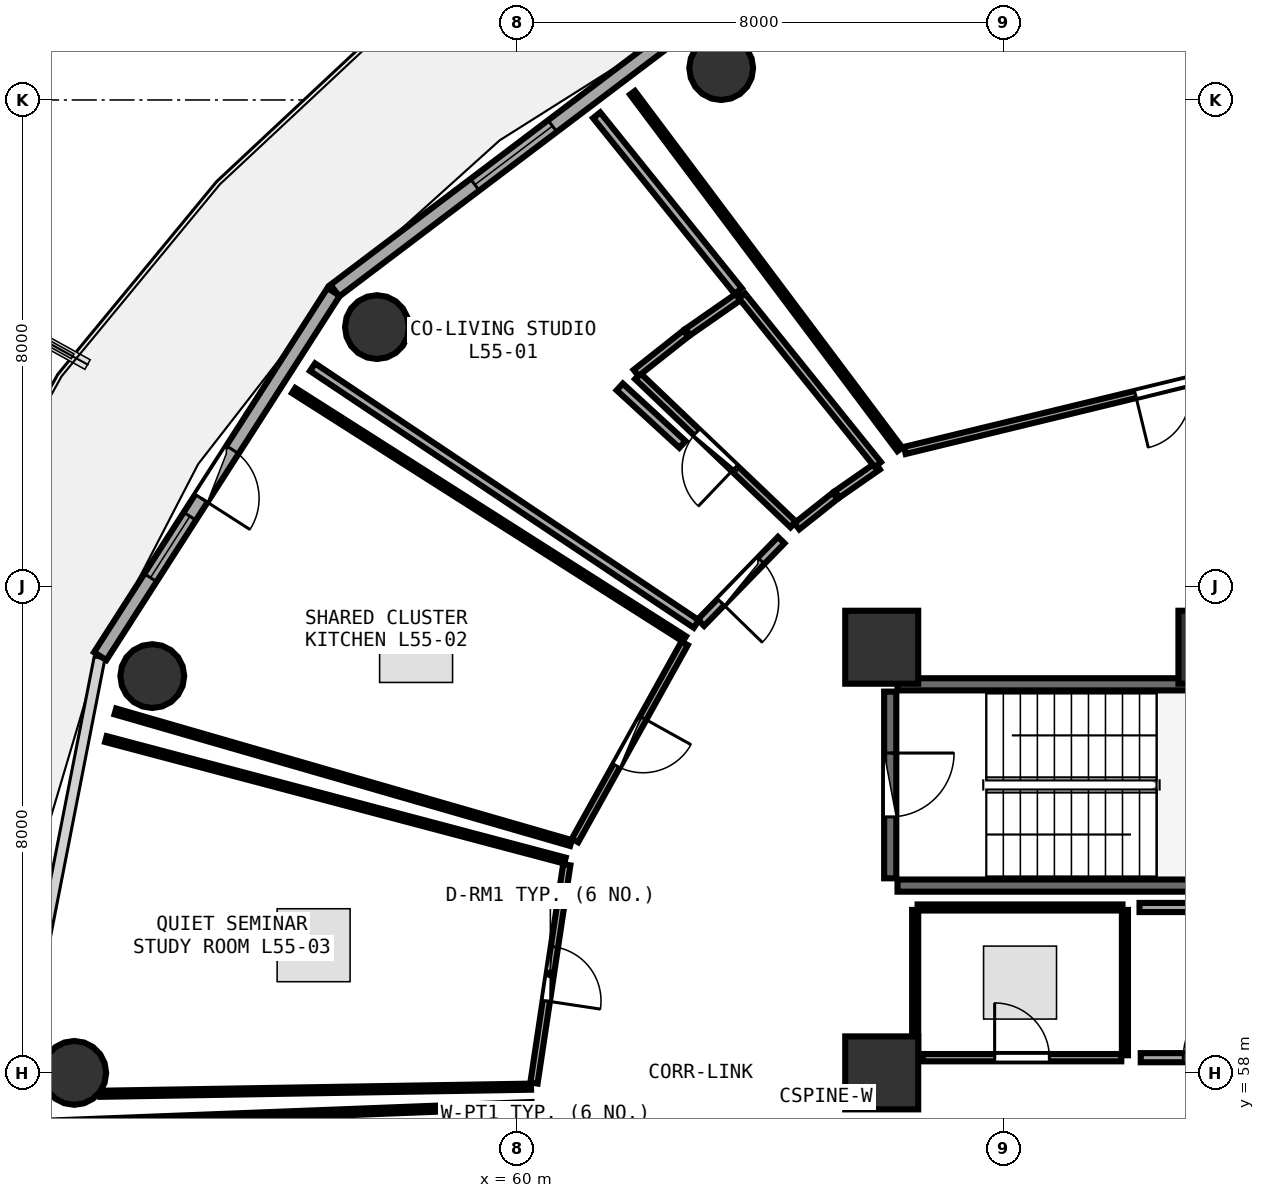
"""IFC4 building model, lengths in metres.
Left out: names, types, materials, properties, quantities, classifications, styles, units other than length and angle.
Written with IfcOpenShell. Run it as: python <this file> out.ifc"""

import sys

from ifc_helpers import new_model, si_unit, direction, frame, frame_2d, origin, origin_2d, place, context, subcontext, project, spatial, rectangle, circle, extrude, element, fill, save


model = new_model("IFC4")
c1 = context("Model", 3, precision=1e-05, world=origin(), true_north=direction((0.0, 1.0)))
c2 = subcontext(c1, "Body", "Model", "MODEL_VIEW")
j1 = project(units=[si_unit("LENGTHUNIT", "METRE"), si_unit("PLANEANGLEUNIT", "RADIAN")], contexts=[c1])
p1 = place(None, origin())
s1 = spatial("IfcSite", under=j1, at=p1, CompositionType="ELEMENT")
p2 = place(p1, origin())
s2 = spatial("IfcBuilding", under=s1, at=p2, CompositionType="ELEMENT")
p3 = place(p2, frame((0.0, 0.0, 215.7)))
s3 = spatial("IfcBuildingStorey", under=s2, at=p3, CompositionType="ELEMENT", Elevation=215.7)
for number, where, z_axis, x_axis in (
    (1, (71.48, 65.0, 0.0), (0.0, 0.0, 1.0), (1.0, 0.0, 0.0)),
    (2, (66.0, 65.0, 0.0), (0.0, 0.0, 1.0), (1.0, 0.0, 0.0)),
    (3, (66.0, 58.0, 0.0), (0.0, 0.0, 1.0), (1.0, 0.0, 0.0)),
):
    element("IfcColumn", number, at=place(p3, frame(where, z_axis=z_axis, x_axis=x_axis)), inside=s3, PredefinedType="PILASTER", context=c2, shape_type="SweptSolid", body=[
        extrude(rectangle(XDim=1.2, YDim=1.2, at=origin_2d()), origin(), (0.0, 0.0, 1.0), 3.75),
    ])
for number, where, z_axis, x_axis in (
    (4, (63.36, 74.524, 0.0), (0.0, 0.0, 1.0), (1.0, 0.0, 0.0)),
    (5, (57.698, 70.264, 0.0), (0.0, 0.0, 1.0), (1.0, 0.0, 0.0)),
    (6, (54.003, 64.526, 0.0), (0.0, 0.0, 1.0), (1.0, 0.0, 0.0)),
    (7, (52.72, 58.0, 0.0), (0.0, 0.0, 1.0), (1.0, 0.0, 0.0)),
):
    element("IfcColumn", number, at=place(p3, frame(where, z_axis=z_axis, x_axis=x_axis)), inside=s3, PredefinedType="COLUMN", context=c2, shape_type="SweptSolid", body=[
        extrude(circle(Radius=0.525, at=origin_2d()), origin(), (0.0, 0.0, 1.0), 3.75),
    ])
p4 = place(p3, frame((62.888, 75.312, 0.0), z_axis=(0.0, 0.0, 1.0), x_axis=(-0.797701674595, -0.603052268338, 0.0)))
e8 = element("IfcWall", 8, at=p4, inside=s3, PredefinedType="SOLIDWALL", context=c2, shape_type="SweptSolid", body=[
    extrude(rectangle(XDim=7.374, YDim=0.24, at=frame_2d((3.687, 0.0))), origin(), (0.0, 0.0, 1.0), 3.475),
])
p5 = place(p4, frame((2.887, 0.0, 0.85)))
e9 = element("IfcOpeningElement", 9, at=p5, cuts=e8, PredefinedType="OPENING", context=c2, shape_type="SweptSolid", body=[
    extrude(rectangle(XDim=1.6, YDim=1.45, at=frame_2d((0.8, 0.725))), frame((0.0, 0.13, 0.0), z_axis=(0.0, -1.0, 0.0), x_axis=(1.0, 0.0, 0.0)), (0.0, 0.0, 1.0), 0.26),
])
p6 = place(p3, frame((56.986, 70.843, 0.0), z_axis=(0.0, 0.0, 1.0), x_axis=(-0.539539512973, -0.841960280501, 0.0)))
e10 = element("IfcWall", 10, at=p6, inside=s3, PredefinedType="SOLIDWALL", context=c2, shape_type="SweptSolid", body=[
    extrude(rectangle(XDim=7.115, YDim=0.24, at=frame_2d((3.557, 0.0))), origin(), (0.0, 0.0, 1.0), 3.475),
])
p7 = place(p6, frame((3.082, 0.0, 0.0)))
e11 = element("IfcOpeningElement", 11, at=p7, cuts=e10, PredefinedType="OPENING", context=c2, shape_type="SweptSolid", body=[
    extrude(rectangle(XDim=0.95, YDim=2.1, at=frame_2d((0.475, 1.05))), frame((0.0, 0.13, 0.0), z_axis=(0.0, -1.0, 0.0), x_axis=(1.0, 0.0, 0.0)), (0.0, 0.0, 1.0), 0.26),
])
p8 = place(p6, frame((4.382, 0.0, 0.85)))
e12 = element("IfcOpeningElement", 12, at=p8, cuts=e10, PredefinedType="OPENING", context=c2, shape_type="SweptSolid", body=[
    extrude(rectangle(XDim=1.2, YDim=1.45, at=frame_2d((0.6, 0.725))), frame((0.0, 0.13, 0.0), z_axis=(0.0, -1.0, 0.0), x_axis=(1.0, 0.0, 0.0)), (0.0, 0.0, 1.0), 0.26),
])
p9 = place(p3, frame((51.803, 57.985, 0.0), z_axis=(0.0, 0.0, 1.0), x_axis=(0.192069055673, -0.981381413036, 0.0)))
e13 = element("IfcWall", 13, at=p9, inside=s3, PredefinedType="SOLIDWALL", context=c2, shape_type="SweptSolid", body=[
    extrude(rectangle(XDim=6.94, YDim=0.24, at=frame_2d((3.47, 0.0))), origin(), (0.0, 0.0, 1.0), 3.475),
])
p10 = place(p9, frame((2.67, 0.0, 0.85)))
e14 = element("IfcOpeningElement", 14, at=p10, cuts=e13, PredefinedType="OPENING", context=c2, shape_type="SweptSolid", body=[
    extrude(rectangle(XDim=1.6, YDim=1.45, at=frame_2d((0.8, 0.725))), frame((0.0, 0.13, 0.0), z_axis=(0.0, -1.0, 0.0), x_axis=(1.0, 0.0, 0.0)), (0.0, 0.0, 1.0), 0.26),
])
for number, where, z_axis, x_axis in (
    (15, (66.26, 61.08, 0.0), (0.0, 0.0, 1.0), (1.0, 0.0, 0.0)),
    (16, (73.42, 64.39, 0.0), (0.0, 0.0, 1.0), (-1.0, 0.0, 0.0)),
):
    element("IfcWall", number, at=place(p3, frame(where, z_axis=z_axis, x_axis=x_axis)), inside=s3, PredefinedType="SHEAR", context=c2, shape_type="SweptSolid", body=[
        extrude(rectangle(XDim=7.16, YDim=0.2, at=frame_2d((3.58, 0.0))), origin(), (0.0, 0.0, 1.0), 3.49),
    ])
p11 = place(p3, frame((66.14, 64.27, 0.0), z_axis=(0.0, 0.0, 1.0), x_axis=(0.0, -1.0, 0.0)))
e17 = element("IfcWall", 17, at=p11, inside=s3, PredefinedType="SHEAR", context=c2, shape_type="SweptSolid", body=[
    extrude(rectangle(XDim=3.07, YDim=0.2, at=frame_2d((1.535, 0.0))), origin(), (0.0, 0.0, 1.0), 3.49),
])
p12 = place(p11, frame((1.01, 0.0, 0.0)))
e18 = element("IfcOpeningElement", 18, at=p12, cuts=e17, PredefinedType="OPENING", context=c2, shape_type="SweptSolid", body=[
    extrude(rectangle(XDim=1.05, YDim=2.1, at=frame_2d((0.525, 1.05))), frame((0.0, 0.11, 0.0), z_axis=(0.0, -1.0, 0.0), x_axis=(1.0, 0.0, 0.0)), (0.0, 0.0, 1.0), 0.22),
])
p13 = place(p3, frame((66.675, 58.25, 0.0), z_axis=(0.0, 0.0, 1.0), x_axis=(1.0, 0.0, 0.0)))
e19 = element("IfcWall", 19, at=p13, inside=s3, PredefinedType="PARTITIONING", context=c2, shape_type="SweptSolid", body=[
    extrude(rectangle(XDim=3.265, YDim=0.12, at=frame_2d((1.632, 0.0))), origin(), (0.0, 0.0, 1.0), 3.48),
])
p14 = place(p13, frame((1.182, 0.0, 0.0)))
e20 = element("IfcOpeningElement", 20, at=p14, cuts=e19, PredefinedType="OPENING", context=c2, shape_type="SweptSolid", body=[
    extrude(rectangle(XDim=0.9, YDim=2.08, at=frame_2d((0.45, 1.04))), frame((0.0, 0.07, 0.0), z_axis=(0.0, -1.0, 0.0), x_axis=(1.0, 0.0, 0.0)), (0.0, 0.0, 1.0), 0.14),
])
p15 = place(p3, frame((70.26, 58.25, 0.0), z_axis=(0.0, 0.0, 1.0), x_axis=(1.0, 0.0, 0.0)))
e21 = element("IfcWall", 21, at=p15, inside=s3, PredefinedType="PARTITIONING", context=c2, shape_type="SweptSolid", body=[
    extrude(rectangle(XDim=2.48, YDim=0.15, at=frame_2d((1.24, 0.0))), origin(), (0.0, 0.0, 1.0), 3.48),
])
p16 = place(p15, frame((0.7, 0.0, 0.0)))
e22 = element("IfcOpeningElement", 22, at=p16, cuts=e21, PredefinedType="OPENING", context=c2, shape_type="SweptSolid", body=[
    extrude(rectangle(XDim=1.08, YDim=2.1, at=frame_2d((0.54, 1.05))), frame((0.0, 0.085, 0.0), z_axis=(0.0, -1.0, 0.0), x_axis=(1.0, 0.0, 0.0)), (0.0, 0.0, 1.0), 0.17),
])
p17 = place(p3, frame((74.84, 70.29, 0.0), z_axis=(0.0, 0.0, 1.0), x_axis=(-0.971771434763, -0.235924306884, 0.0)))
e23 = element("IfcWall", 23, at=p17, inside=s3, PredefinedType="PARTITIONING", context=c2, shape_type="SweptSolid", body=[
    extrude(rectangle(XDim=8.705, YDim=0.12, at=frame_2d((4.353, 0.0))), origin(), (0.0, 0.0, 1.0), 3.025),
])
p18 = place(p17, frame((3.903, 0.0, 0.0)))
e24 = element("IfcOpeningElement", 24, at=p18, cuts=e23, PredefinedType="OPENING", context=c2, shape_type="SweptSolid", body=[
    extrude(rectangle(XDim=0.9, YDim=2.08, at=frame_2d((0.45, 1.04))), frame((0.0, 0.07, 0.0), z_axis=(0.0, -1.0, 0.0), x_axis=(1.0, 0.0, 0.0)), (0.0, 0.0, 1.0), 0.14),
])
p19 = place(p3, frame((64.545, 67.018, 0.0), z_axis=(0.0, 0.0, 1.0), x_axis=(-0.723495138875, 0.690329474979, 0.0)))
e25 = element("IfcWall", 25, at=p19, inside=s3, PredefinedType="PLUMBINGWALL", context=c2, shape_type="SweptSolid", body=[
    extrude(rectangle(XDim=3.533, YDim=0.13, at=frame_2d((1.767, 0.0))), origin(), (0.0, 0.0, 1.0), 3.175),
])
p20 = place(p19, frame((1.337, 0.0, 0.0)))
e26 = element("IfcOpeningElement", 26, at=p20, cuts=e25, PredefinedType="OPENING", context=c2, shape_type="SweptSolid", body=[
    extrude(rectangle(XDim=0.86, YDim=2.05, at=frame_2d((0.43, 1.025))), frame((0.0, 0.075, 0.0), z_axis=(0.0, -1.0, 0.0), x_axis=(1.0, 0.0, 0.0)), (0.0, 0.0, 1.0), 0.15),
])
p21 = place(p3, frame((64.347, 66.762, 0.0), z_axis=(0.0, 0.0, 1.0), x_axis=(-0.697118859216, -0.716955574722, 0.0)))
e27 = element("IfcWall", 27, at=p21, inside=s3, PredefinedType="PARTITIONING", context=c2, shape_type="SweptSolid", body=[
    extrude(rectangle(XDim=1.895, YDim=0.15, at=frame_2d((0.948, 0.0))), origin(), (0.0, 0.0, 1.0), 3.025),
])
p22 = place(p21, frame((0.473, 0.0, 0.0)))
e28 = element("IfcOpeningElement", 28, at=p22, cuts=e27, PredefinedType="OPENING", context=c2, shape_type="SweptSolid", body=[
    extrude(rectangle(XDim=0.95, YDim=2.08, at=frame_2d((0.475, 1.04))), frame((0.0, 0.085, 0.0), z_axis=(0.0, -1.0, 0.0), x_axis=(1.0, 0.0, 0.0)), (0.0, 0.0, 1.0), 0.17),
])
p23 = place(p3, frame((62.759, 65.064, 0.0), z_axis=(0.0, 0.0, 1.0), x_axis=(-0.485877595764, -0.874026865683, 0.0)))
e29 = element("IfcWall", 29, at=p23, inside=s3, PredefinedType="PARTITIONING", context=c2, shape_type="SweptSolid", body=[
    extrude(rectangle(XDim=3.71, YDim=0.12, at=frame_2d((1.855, 0.0))), origin(), (0.0, 0.0, 1.0), 3.025),
])
p24 = place(p23, frame((1.405, 0.0, 0.0)))
e30 = element("IfcOpeningElement", 30, at=p24, cuts=e29, PredefinedType="OPENING", context=c2, shape_type="SweptSolid", body=[
    extrude(rectangle(XDim=0.9, YDim=2.08, at=frame_2d((0.45, 1.04))), frame((0.0, 0.07, 0.0), z_axis=(0.0, -1.0, 0.0), x_axis=(1.0, 0.0, 0.0)), (0.0, 0.0, 1.0), 0.14),
])
p25 = place(p3, frame((60.82, 61.422, 0.0), z_axis=(0.0, 0.0, 1.0), x_axis=(-0.148557592641, -0.988903757536, 0.0)))
e31 = element("IfcWall", 31, at=p25, inside=s3, PredefinedType="PARTITIONING", context=c2, shape_type="SweptSolid", body=[
    extrude(rectangle(XDim=3.629, YDim=0.12, at=frame_2d((1.814, 0.0))), origin(), (0.0, 0.0, 1.0), 3.025),
])
p26 = place(p25, frame((1.364, 0.0, 0.0)))
e32 = element("IfcOpeningElement", 32, at=p26, cuts=e31, PredefinedType="OPENING", context=c2, shape_type="SweptSolid", body=[
    extrude(rectangle(XDim=0.9, YDim=2.08, at=frame_2d((0.45, 1.04))), frame((0.0, 0.07, 0.0), z_axis=(0.0, -1.0, 0.0), x_axis=(1.0, 0.0, 0.0)), (0.0, 0.0, 1.0), 0.14),
])
p27 = place(p3, frame((60.296, 57.414, 0.0), z_axis=(0.0, 0.0, 1.0), x_axis=(0.214769597133, -0.976664742963, 0.0)))
e33 = element("IfcWall", 33, at=p27, inside=s3, PredefinedType="PARTITIONING", context=c2, shape_type="SweptSolid", body=[
    extrude(rectangle(XDim=3.638, YDim=0.12, at=frame_2d((1.819, 0.0))), origin(), (0.0, 0.0, 1.0), 3.48),
])
p28 = place(p27, frame((1.369, 0.0, 0.0)))
e34 = element("IfcOpeningElement", 34, at=p28, cuts=e33, PredefinedType="OPENING", context=c2, shape_type="SweptSolid", body=[
    extrude(rectangle(XDim=0.9, YDim=2.08, at=frame_2d((0.45, 1.04))), frame((0.0, 0.07, 0.0), z_axis=(0.0, -1.0, 0.0), x_axis=(1.0, 0.0, 0.0)), (0.0, 0.0, 1.0), 0.14),
])
p29 = place(p3, frame((70.0, 58.29, 0.0), z_axis=(0.0, 0.0, 1.0), x_axis=(0.0, 1.0, 0.0)))
e35 = element("IfcWall", 35, at=p29, inside=s3, PredefinedType="PARTITIONING", context=c2, shape_type="SweptSolid", body=[
    extrude(rectangle(XDim=2.39, YDim=0.1, at=frame_2d((1.195, 0.0))), origin(), (0.0, 0.0, 1.0), 3.48),
])
p30 = place(p3, frame((69.96, 60.72, 0.0), z_axis=(0.0, 0.0, 1.0), x_axis=(-1.0, 0.0, 0.0)))
e36 = element("IfcWall", 36, at=p30, inside=s3, PredefinedType="PARTITIONING", context=c2, shape_type="SweptSolid", body=[
    extrude(rectangle(XDim=3.37, YDim=0.1, at=frame_2d((1.685, 0.0))), origin(), (0.0, 0.0, 1.0), 3.48),
])
p31 = place(p3, frame((66.55, 60.68, 0.0), z_axis=(0.0, 0.0, 1.0), x_axis=(0.0, -1.0, 0.0)))
e37 = element("IfcWall", 37, at=p31, inside=s3, PredefinedType="PARTITIONING", context=c2, shape_type="SweptSolid", body=[
    extrude(rectangle(XDim=2.383, YDim=0.1, at=frame_2d((1.191, 0.0))), origin(), (0.0, 0.0, 1.0), 3.48),
])
p32 = place(p3, frame((72.76, 60.72, 0.0), z_axis=(0.0, 0.0, 1.0), x_axis=(-1.0, 0.0, 0.0)))
e38 = element("IfcWall", 38, at=p32, inside=s3, PredefinedType="PARTITIONING", context=c2, shape_type="SweptSolid", body=[
    extrude(rectangle(XDim=2.52, YDim=0.15, at=frame_2d((1.26, 0.0))), origin(), (0.0, 0.0, 1.0), 3.48),
])
p33 = place(p3, frame((66.298, 68.254, 0.0), z_axis=(0.0, 0.0, 1.0), x_axis=(-0.599930714763, 0.80005195924, 0.0)))
e39 = element("IfcWall", 39, at=p33, inside=s3, PredefinedType="PARTITIONING", context=c2, shape_type="SweptSolid", body=[
    extrude(rectangle(XDim=7.33, YDim=0.1, at=frame_2d((3.665, 0.0))), origin(), (0.0, 0.0, 1.0), 3.025),
])
p34 = place(p3, frame((65.933, 67.977, 0.0), z_axis=(0.0, 0.0, 1.0), x_axis=(-0.821107527055, -0.570773535663, 0.0)))
e40 = element("IfcWall", 40, at=p34, inside=s3, PredefinedType="PLUMBINGWALL", context=c2, shape_type="SweptSolid", body=[
    extrude(rectangle(XDim=0.812, YDim=0.13, at=frame_2d((0.406, 0.0))), origin(), (0.0, 0.0, 1.0), 3.025),
])
p35 = place(p3, frame((65.234, 67.49, 0.0), z_axis=(0.0, 0.0, 1.0), x_axis=(-0.783584251465, -0.621285538908, 0.0)))
e41 = element("IfcWall", 41, at=p35, inside=s3, PredefinedType="PLUMBINGWALL", context=c2, shape_type="SweptSolid", body=[
    extrude(rectangle(XDim=0.805, YDim=0.13, at=frame_2d((0.402, 0.0))), origin(), (0.0, 0.0, 1.0), 3.025),
])
p36 = place(p3, frame((61.961, 69.511, 0.0), z_axis=(0.0, 0.0, 1.0), x_axis=(0.784079055359, 0.620660966186, 0.0)))
e42 = element("IfcWall", 42, at=p36, inside=s3, PredefinedType="PLUMBINGWALL", context=c2, shape_type="SweptSolid", body=[
    extrude(rectangle(XDim=1.043, YDim=0.13, at=frame_2d((0.521, 0.0))), origin(), (0.0, 0.0, 1.0), 3.48),
])
p37 = place(p3, frame((62.81, 70.182, 0.0), z_axis=(0.0, 0.0, 1.0), x_axis=(0.820692025527, 0.571370807127, 0.0)))
e43 = element("IfcWall", 43, at=p37, inside=s3, PredefinedType="PLUMBINGWALL", context=c2, shape_type="SweptSolid", body=[
    extrude(rectangle(XDim=1.051, YDim=0.13, at=frame_2d((0.525, 0.0))), origin(), (0.0, 0.0, 1.0), 3.48),
])
p38 = place(p3, frame((63.701, 70.778, 0.0), z_axis=(0.0, 0.0, 1.0), x_axis=(0.627323766187, -0.778758558461, 0.0)))
e44 = element("IfcWall", 44, at=p38, inside=s3, PredefinedType="PLUMBINGWALL", context=c2, shape_type="SweptSolid", body=[
    extrude(rectangle(XDim=3.563, YDim=0.13, at=frame_2d((1.781, 0.0))), origin(), (0.0, 0.0, 1.0), 3.025),
])
p39 = place(p3, frame((62.951, 65.382, 0.0), z_axis=(0.0, 0.0, 1.0), x_axis=(-0.831079650143, 0.556153409697, 0.0)))
e45 = element("IfcWall", 45, at=p39, inside=s3, PredefinedType="PARTITIONING", context=c2, shape_type="SweptSolid", body=[
    extrude(rectangle(XDim=7.594, YDim=0.15, at=frame_2d((3.797, 0.0))), origin(), (0.0, 0.0, 1.0), 3.075),
])
p40 = place(p3, frame((61.312, 73.749, 0.0), z_axis=(0.0, 0.0, 1.0), x_axis=(0.627090198143, -0.778946649901, 0.0)))
e46 = element("IfcWall", 46, at=p40, inside=s3, PredefinedType="PARTITIONING", context=c2, shape_type="SweptSolid", body=[
    extrude(rectangle(XDim=3.712, YDim=0.15, at=frame_2d((1.856, 0.0))), origin(), (0.0, 0.0, 1.0), 3.075),
])
p41 = place(p3, frame((61.691, 69.281, 0.0), z_axis=(0.0, 0.0, 1.0), x_axis=(0.736726740779, -0.676190586611, 0.0)))
e47 = element("IfcWall", 47, at=p41, inside=s3, PredefinedType="PARTITIONING", context=c2, shape_type="SweptSolid", body=[
    extrude(rectangle(XDim=1.399, YDim=0.15, at=frame_2d((0.7, 0.0))), origin(), (0.0, 0.0, 1.0), 3.175),
])
p42 = place(p3, frame((60.889, 61.78, 0.0), z_axis=(0.0, 0.0, 1.0), x_axis=(-0.960734399679, 0.277469661899, 0.0)))
e48 = element("IfcWall", 48, at=p42, inside=s3, PredefinedType="PARTITIONING", context=c2, shape_type="SweptSolid", body=[
    extrude(rectangle(XDim=7.798, YDim=0.1, at=frame_2d((3.899, 0.0))), origin(), (0.0, 0.0, 1.0), 3.075),
])
p43 = place(p3, frame((56.329, 69.221, 0.0), z_axis=(0.0, 0.0, 1.0), x_axis=(0.843949218332, -0.536423076383, 0.0)))
e49 = element("IfcWall", 49, at=p43, inside=s3, PredefinedType="PARTITIONING", context=c2, shape_type="SweptSolid", body=[
    extrude(rectangle(XDim=7.613, YDim=0.1, at=frame_2d((3.807, 0.0))), origin(), (0.0, 0.0, 1.0), 3.075),
])
p44 = place(p3, frame((60.232, 57.773, 0.0), z_axis=(0.0, 0.0, 1.0), x_axis=(-0.999864271248, -0.016475408379, 0.0)))
e50 = element("IfcWall", 50, at=p44, inside=s3, PredefinedType="PARTITIONING", context=c2, shape_type="SweptSolid", body=[
    extrude(rectangle(XDim=7.083, YDim=0.1, at=frame_2d((3.542, 0.0))), origin(), (0.0, 0.0, 1.0), 3.175),
])
p45 = place(p3, frame((53.241, 63.49, 0.0), z_axis=(0.0, 0.0, 1.0), x_axis=(0.966701361123, -0.25590716755, 0.0)))
e51 = element("IfcWall", 51, at=p45, inside=s3, PredefinedType="PARTITIONING", context=c2, shape_type="SweptSolid", body=[
    extrude(rectangle(XDim=7.81, YDim=0.1, at=frame_2d((3.905, 0.0))), origin(), (0.0, 0.0, 1.0), 3.075),
])
p46 = place(p3, frame((52.38, 57.168, 0.0), z_axis=(0.0, 0.0, 1.0), x_axis=(0.999258468257, 0.038503423452, 0.0)))
e52 = element("IfcWall", 52, at=p46, inside=s3, PredefinedType="PARTITIONING", context=c2, shape_type="SweptSolid", body=[
    extrude(rectangle(XDim=7.869, YDim=0.1, at=frame_2d((3.935, 0.0))), origin(), (0.0, 0.0, 1.0), 3.075),
])
p47 = place(p5, origin())
e53 = element("IfcWindow", 53, at=p47, inside=s3, PartitioningType="SINGLE_PANEL", PredefinedType="WINDOW", context=c2, shape_type="SweptSolid", body=[
    extrude(rectangle(XDim=1.6, YDim=1.45, at=frame_2d((0.8, 0.725))), frame((0.0, 0.03, 0.0), z_axis=(0.0, -1.0, 0.0), x_axis=(1.0, 0.0, 0.0)), (0.0, 0.0, 1.0), 0.06),
])
fill(e9, e53)
p48 = place(p7, frame((0.95, 0.0, 0.0), z_axis=(0.0, 0.0, 1.0), x_axis=(-1.0, 0.0, 0.0)))
e54 = element("IfcDoor", 54, at=p48, inside=s3, OperationType="SINGLE_SWING_LEFT", PredefinedType="DOOR", context=c2, shape_type="SweptSolid", body=[
    extrude(rectangle(XDim=0.95, YDim=2.1, at=frame_2d((0.475, 1.05))), frame((0.0, 0.025, 0.0), z_axis=(0.0, -1.0, 0.0), x_axis=(1.0, 0.0, 0.0)), (0.0, 0.0, 1.0), 0.05),
])
fill(e11, e54)
p49 = place(p8, origin())
e55 = element("IfcWindow", 55, at=p49, inside=s3, PartitioningType="SINGLE_PANEL", PredefinedType="WINDOW", context=c2, shape_type="SweptSolid", body=[
    extrude(rectangle(XDim=1.2, YDim=1.45, at=frame_2d((0.6, 0.725))), frame((0.0, 0.03, 0.0), z_axis=(0.0, -1.0, 0.0), x_axis=(1.0, 0.0, 0.0)), (0.0, 0.0, 1.0), 0.06),
])
fill(e12, e55)
p50 = place(p12, origin())
e56 = element("IfcDoor", 56, at=p50, inside=s3, OperationType="SINGLE_SWING_LEFT", PredefinedType="DOOR", context=c2, shape_type="SweptSolid", body=[
    extrude(rectangle(XDim=1.05, YDim=2.1, at=frame_2d((0.525, 1.05))), frame((0.0, 0.025, 0.0), z_axis=(0.0, -1.0, 0.0), x_axis=(1.0, 0.0, 0.0)), (0.0, 0.0, 1.0), 0.05),
])
fill(e18, e56)
p51 = place(p14, origin())
e57 = element("IfcDoor", 57, at=p51, inside=s3, OperationType="SINGLE_SWING_LEFT", PredefinedType="DOOR", context=c2, shape_type="SweptSolid", body=[
    extrude(rectangle(XDim=0.9, YDim=2.08, at=frame_2d((0.45, 1.04))), frame((0.0, 0.025, 0.0), z_axis=(0.0, -1.0, 0.0), x_axis=(1.0, 0.0, 0.0)), (0.0, 0.0, 1.0), 0.05),
])
fill(e20, e57)
p52 = place(p16, origin())
e58 = element("IfcDoor", 58, at=p52, inside=s3, OperationType="SINGLE_SWING_RIGHT", PredefinedType="DOOR", context=c2, shape_type="SweptSolid", body=[
    extrude(rectangle(XDim=1.08, YDim=2.1, at=frame_2d((0.54, 1.05))), frame((0.0, 0.025, 0.0), z_axis=(0.0, -1.0, 0.0), x_axis=(1.0, 0.0, 0.0)), (0.0, 0.0, 1.0), 0.05),
])
fill(e22, e58)
p53 = place(p18, origin())
e59 = element("IfcDoor", 59, at=p53, inside=s3, OperationType="SINGLE_SWING_RIGHT", PredefinedType="DOOR", context=c2, shape_type="SweptSolid", body=[
    extrude(rectangle(XDim=0.9, YDim=2.08, at=frame_2d((0.45, 1.04))), frame((0.0, 0.025, 0.0), z_axis=(0.0, -1.0, 0.0), x_axis=(1.0, 0.0, 0.0)), (0.0, 0.0, 1.0), 0.05),
])
fill(e24, e59)
p54 = place(p20, origin())
e60 = element("IfcDoor", 60, at=p54, inside=s3, OperationType="SINGLE_SWING_LEFT", PredefinedType="DOOR", context=c2, shape_type="SweptSolid", body=[
    extrude(rectangle(XDim=0.86, YDim=2.05, at=frame_2d((0.43, 1.025))), frame((0.0, 0.025, 0.0), z_axis=(0.0, -1.0, 0.0), x_axis=(1.0, 0.0, 0.0)), (0.0, 0.0, 1.0), 0.05),
])
fill(e26, e60)
p55 = place(p22, origin())
e61 = element("IfcDoor", 61, at=p55, inside=s3, OperationType="SINGLE_SWING_RIGHT", PredefinedType="DOOR", context=c2, shape_type="SweptSolid", body=[
    extrude(rectangle(XDim=0.95, YDim=2.08, at=frame_2d((0.475, 1.04))), frame((0.0, 0.025, 0.0), z_axis=(0.0, -1.0, 0.0), x_axis=(1.0, 0.0, 0.0)), (0.0, 0.0, 1.0), 0.05),
])
fill(e28, e61)
p56 = place(p24, origin())
e62 = element("IfcDoor", 62, at=p56, inside=s3, OperationType="SINGLE_SWING_LEFT", PredefinedType="DOOR", context=c2, shape_type="SweptSolid", body=[
    extrude(rectangle(XDim=0.9, YDim=2.08, at=frame_2d((0.45, 1.04))), frame((0.0, 0.025, 0.0), z_axis=(0.0, -1.0, 0.0), x_axis=(1.0, 0.0, 0.0)), (0.0, 0.0, 1.0), 0.05),
])
fill(e30, e62)
p57 = place(p26, origin())
e63 = element("IfcDoor", 63, at=p57, inside=s3, OperationType="SINGLE_SWING_RIGHT", PredefinedType="DOOR", context=c2, shape_type="SweptSolid", body=[
    extrude(rectangle(XDim=0.9, YDim=2.08, at=frame_2d((0.45, 1.04))), frame((0.0, 0.025, 0.0), z_axis=(0.0, -1.0, 0.0), x_axis=(1.0, 0.0, 0.0)), (0.0, 0.0, 1.0), 0.05),
])
fill(e32, e63)
save(model, sys.argv[1])
